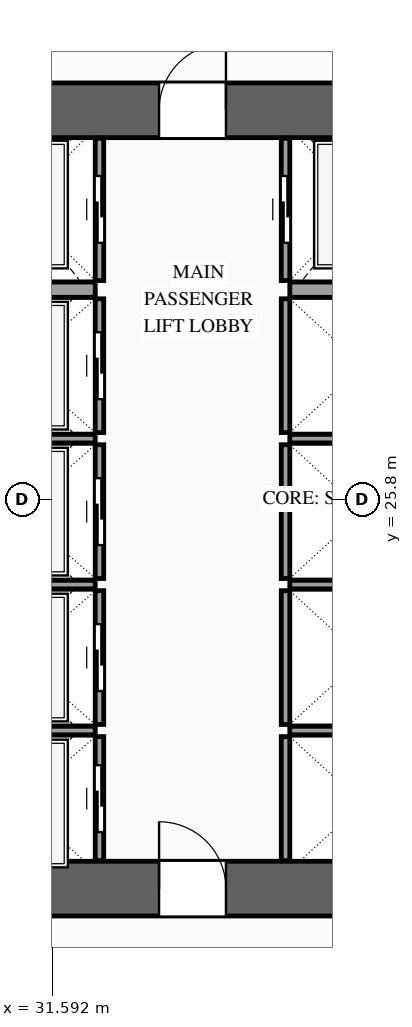
"""IFC4 building model, lengths in metres.
Left out: names, types, materials, properties, quantities, classifications, styles, units other than length and angle.
Written with IfcOpenShell. Run it as: python <this file> out.ifc"""

import sys

from ifc_helpers import new_model, si_unit, direction, frame, frame_2d, origin, place, context, subcontext, project, spatial, rectangle, extrude, source, transform, mapped, element, fill, save


model = new_model("IFC4")
c1 = context("Model", 3, precision=1e-05, world=origin(), true_north=direction((0.0, 1.0)))
c2 = subcontext(c1, "Body", "Model", "MODEL_VIEW")
j1 = project(units=[si_unit("LENGTHUNIT", "METRE"), si_unit("PLANEANGLEUNIT", "RADIAN")], contexts=[c1])
p1 = place(None, origin())
s1 = spatial("IfcSite", under=j1, at=p1, CompositionType="ELEMENT")
p2 = place(p1, origin())
s2 = spatial("IfcBuilding", under=s1, at=p2, CompositionType="ELEMENT")
p3 = place(p2, frame((0.0, 0.0, 19.8)))
s3 = spatial("IfcBuildingStorey", under=s2, at=p3, CompositionType="ELEMENT", Elevation=19.8)
p4 = place(p3, frame((23.35, 19.4, 0.0), z_axis=(0.0, 0.0, 1.0), x_axis=(1.0, 0.0, 0.0)))
e1 = element("IfcWall", 1, at=p4, inside=s3, PredefinedType="SHEAR", context=c2, shape_type="SweptSolid", body=[
    extrude(rectangle(XDim=27.3, YDim=0.9, at=frame_2d((13.65, 0.0))), origin(), (0.0, 0.0, 1.0), 6.0),
])
p5 = place(p4, frame((2.1, 0.0, 0.0)))
e2 = element("IfcOpeningElement", 2, at=p5, cuts=e1, PredefinedType="OPENING", context=c2, shape_type="SweptSolid", body=[
    extrude(rectangle(XDim=1.1, YDim=2.2, at=frame_2d((0.55, 1.1))), frame((0.0, 0.465, 0.0), z_axis=(0.0, -1.0, 0.0), x_axis=(1.0, 0.0, 0.0)), (0.0, 0.0, 1.0), 0.93),
])
p6 = place(p4, frame((10.0, 0.0, 0.0)))
e3 = element("IfcOpeningElement", 3, at=p6, cuts=e1, PredefinedType="OPENING", context=c2, shape_type="SweptSolid", body=[
    extrude(rectangle(XDim=1.1, YDim=2.2, at=frame_2d((0.55, 1.1))), frame((0.0, 0.465, 0.0), z_axis=(0.0, -1.0, 0.0), x_axis=(1.0, 0.0, 0.0)), (0.0, 0.0, 1.0), 0.93),
])
p7 = place(p4, frame((23.2, 0.0, 0.0)))
e4 = element("IfcOpeningElement", 4, at=p7, cuts=e1, PredefinedType="OPENING", context=c2, shape_type="SweptSolid", body=[
    extrude(rectangle(XDim=1.1, YDim=2.2, at=frame_2d((0.55, 1.1))), frame((0.0, 0.465, 0.0), z_axis=(0.0, -1.0, 0.0), x_axis=(1.0, 0.0, 0.0)), (0.0, 0.0, 1.0), 0.93),
])
p8 = place(p4, frame((19.82, 0.0, 0.0)))
e5 = element("IfcOpeningElement", 5, at=p8, cuts=e1, PredefinedType="OPENING", context=c2, shape_type="SweptSolid", body=[
    extrude(rectangle(XDim=0.9, YDim=2.15, at=frame_2d((0.45, 1.075))), frame((0.0, 0.465, 0.0), z_axis=(0.0, -1.0, 0.0), x_axis=(1.0, 0.0, 0.0)), (0.0, 0.0, 1.0), 0.93),
])
p9 = place(p4, frame((18.38, 0.0, 0.0)))
e6 = element("IfcOpeningElement", 6, at=p9, cuts=e1, PredefinedType="OPENING", context=c2, shape_type="SweptSolid", body=[
    extrude(rectangle(XDim=0.9, YDim=2.15, at=frame_2d((0.45, 1.075))), frame((0.0, 0.465, 0.0), z_axis=(0.0, -1.0, 0.0), x_axis=(1.0, 0.0, 0.0)), (0.0, 0.0, 1.0), 0.93),
])
p10 = place(p3, frame((23.35, 32.2, 0.0), z_axis=(0.0, 0.0, 1.0), x_axis=(1.0, 0.0, 0.0)))
e7 = element("IfcWall", 7, at=p10, inside=s3, PredefinedType="SHEAR", context=c2, shape_type="SweptSolid", body=[
    extrude(rectangle(XDim=27.3, YDim=0.9, at=frame_2d((13.65, 0.0))), origin(), (0.0, 0.0, 1.0), 6.0),
])
p11 = place(p10, frame((4.72, 0.0, 0.0)))
e8 = element("IfcOpeningElement", 8, at=p11, cuts=e7, PredefinedType="OPENING", context=c2, shape_type="SweptSolid", body=[
    extrude(rectangle(XDim=0.9, YDim=2.15, at=frame_2d((0.45, 1.075))), frame((0.0, 0.465, 0.0), z_axis=(0.0, -1.0, 0.0), x_axis=(1.0, 0.0, 0.0)), (0.0, 0.0, 1.0), 0.93),
])
p12 = place(p10, frame((10.0, 0.0, 0.0)))
e9 = element("IfcOpeningElement", 9, at=p12, cuts=e7, PredefinedType="OPENING", context=c2, shape_type="SweptSolid", body=[
    extrude(rectangle(XDim=1.1, YDim=2.2, at=frame_2d((0.55, 1.1))), frame((0.0, 0.465, 0.0), z_axis=(0.0, -1.0, 0.0), x_axis=(1.0, 0.0, 0.0)), (0.0, 0.0, 1.0), 0.93),
])
p13 = place(p10, frame((15.85, 0.0, 0.0)))
e10 = element("IfcOpeningElement", 10, at=p13, cuts=e7, PredefinedType="OPENING", context=c2, shape_type="SweptSolid", body=[
    extrude(rectangle(XDim=1.1, YDim=2.2, at=frame_2d((0.55, 1.1))), frame((0.0, 0.465, 0.0), z_axis=(0.0, -1.0, 0.0), x_axis=(1.0, 0.0, 0.0)), (0.0, 0.0, 1.0), 0.93),
])
p14 = place(p10, frame((19.82, 0.0, 0.0)))
e11 = element("IfcOpeningElement", 11, at=p14, cuts=e7, PredefinedType="OPENING", context=c2, shape_type="SweptSolid", body=[
    extrude(rectangle(XDim=0.9, YDim=2.15, at=frame_2d((0.45, 1.075))), frame((0.0, 0.465, 0.0), z_axis=(0.0, -1.0, 0.0), x_axis=(1.0, 0.0, 0.0)), (0.0, 0.0, 1.0), 0.93),
])
p15 = place(p3, frame((32.37, 19.86, 0.0), z_axis=(0.0, 0.0, 1.0), x_axis=(0.0, 1.0, 0.0)))
e12 = element("IfcWall", 12, at=p15, inside=s3, PredefinedType="SOLIDWALL", context=c2, shape_type="SweptSolid", body=[
    extrude(rectangle(XDim=2.04, YDim=0.14, at=frame_2d((1.02, 0.0))), origin(), (0.0, 0.0, 1.0), 5.68),
])
p16 = place(p15, frame((0.47, 0.0, 0.0)))
e13 = element("IfcOpeningElement", 13, at=p16, cuts=e12, PredefinedType="OPENING", context=c2, shape_type="SweptSolid", body=[
    extrude(rectangle(XDim=1.1, YDim=2.2, at=frame_2d((0.55, 1.1))), frame((0.0, 0.085, 0.0), z_axis=(0.0, -1.0, 0.0), x_axis=(1.0, 0.0, 0.0)), (0.0, 0.0, 1.0), 0.17),
])
m1 = source(origin(), c2, "Body", "SweptSolid", [
    extrude(rectangle(XDim=2.5, YDim=0.14, at=frame_2d((1.25, 0.0))), origin(), (0.0, 0.0, 1.0), 5.68),
])
p17 = place(p3, frame((29.8, 22.0, 0.0), z_axis=(0.0, 0.0, 1.0), x_axis=(1.0, 0.0, 0.0)))
e14 = element("IfcWall", 14, at=p17, inside=s3, PredefinedType="SOLIDWALL", context=c2, shape_type="MappedRepresentation", body=[
    mapped(m1, transform((0.0, 0.0, 0.0), scale=1.0)),
])
p18 = place(p3, frame((32.37, 22.1, 0.0), z_axis=(0.0, 0.0, 1.0), x_axis=(0.0, 1.0, 0.0)))
e15 = element("IfcWall", 15, at=p18, inside=s3, PredefinedType="SOLIDWALL", context=c2, shape_type="SweptSolid", body=[
    extrude(rectangle(XDim=2.2, YDim=0.14, at=frame_2d((1.1, 0.0))), origin(), (0.0, 0.0, 1.0), 5.68),
])
p19 = place(p18, frame((0.55, 0.0, 0.0)))
e16 = element("IfcOpeningElement", 16, at=p19, cuts=e15, PredefinedType="OPENING", context=c2, shape_type="SweptSolid", body=[
    extrude(rectangle(XDim=1.1, YDim=2.2, at=frame_2d((0.55, 1.1))), frame((0.0, 0.085, 0.0), z_axis=(0.0, -1.0, 0.0), x_axis=(1.0, 0.0, 0.0)), (0.0, 0.0, 1.0), 0.17),
])
p20 = place(p3, frame((29.8, 24.4, 0.0), z_axis=(0.0, 0.0, 1.0), x_axis=(1.0, 0.0, 0.0)))
e17 = element("IfcWall", 17, at=p20, inside=s3, PredefinedType="SOLIDWALL", context=c2, shape_type="MappedRepresentation", body=[
    mapped(m1, transform((0.0, 0.0, 0.0), scale=1.0)),
])
p21 = place(p3, frame((32.37, 24.5, 0.0), z_axis=(0.0, 0.0, 1.0), x_axis=(0.0, 1.0, 0.0)))
e18 = element("IfcWall", 18, at=p21, inside=s3, PredefinedType="SOLIDWALL", context=c2, shape_type="SweptSolid", body=[
    extrude(rectangle(XDim=2.2, YDim=0.14, at=frame_2d((1.1, 0.0))), origin(), (0.0, 0.0, 1.0), 5.68),
])
p22 = place(p21, frame((0.55, 0.0, 0.0)))
e19 = element("IfcOpeningElement", 19, at=p22, cuts=e18, PredefinedType="OPENING", context=c2, shape_type="SweptSolid", body=[
    extrude(rectangle(XDim=1.1, YDim=2.2, at=frame_2d((0.55, 1.1))), frame((0.0, 0.085, 0.0), z_axis=(0.0, -1.0, 0.0), x_axis=(1.0, 0.0, 0.0)), (0.0, 0.0, 1.0), 0.17),
])
p23 = place(p3, frame((29.8, 26.8, 0.0), z_axis=(0.0, 0.0, 1.0), x_axis=(1.0, 0.0, 0.0)))
e20 = element("IfcWall", 20, at=p23, inside=s3, PredefinedType="SOLIDWALL", context=c2, shape_type="MappedRepresentation", body=[
    mapped(m1, transform((0.0, 0.0, 0.0), scale=1.0)),
])
p24 = place(p3, frame((32.37, 26.9, 0.0), z_axis=(0.0, 0.0, 1.0), x_axis=(0.0, 1.0, 0.0)))
e21 = element("IfcWall", 21, at=p24, inside=s3, PredefinedType="SOLIDWALL", context=c2, shape_type="SweptSolid", body=[
    extrude(rectangle(XDim=2.2, YDim=0.14, at=frame_2d((1.1, 0.0))), origin(), (0.0, 0.0, 1.0), 5.68),
])
p25 = place(p24, frame((0.55, 0.0, 0.0)))
e22 = element("IfcOpeningElement", 22, at=p25, cuts=e21, PredefinedType="OPENING", context=c2, shape_type="SweptSolid", body=[
    extrude(rectangle(XDim=1.1, YDim=2.2, at=frame_2d((0.55, 1.1))), frame((0.0, 0.085, 0.0), z_axis=(0.0, -1.0, 0.0), x_axis=(1.0, 0.0, 0.0)), (0.0, 0.0, 1.0), 0.17),
])
p26 = place(p3, frame((32.37, 29.4, 0.0), z_axis=(0.0, 0.0, 1.0), x_axis=(0.0, 1.0, 0.0)))
e23 = element("IfcWall", 23, at=p26, inside=s3, PredefinedType="SOLIDWALL", context=c2, shape_type="SweptSolid", body=[
    extrude(rectangle(XDim=2.34, YDim=0.14, at=frame_2d((1.17, 0.0))), origin(), (0.0, 0.0, 1.0), 5.68),
])
p27 = place(p26, frame((0.62, 0.0, 0.0)))
e24 = element("IfcOpeningElement", 24, at=p27, cuts=e23, PredefinedType="OPENING", context=c2, shape_type="SweptSolid", body=[
    extrude(rectangle(XDim=1.1, YDim=2.2, at=frame_2d((0.55, 1.1))), frame((0.0, 0.085, 0.0), z_axis=(0.0, -1.0, 0.0), x_axis=(1.0, 0.0, 0.0)), (0.0, 0.0, 1.0), 0.17),
])
m2 = source(origin(), c2, "Body", "SweptSolid", [
    extrude(rectangle(XDim=2.5, YDim=0.25, at=frame_2d((1.25, 0.0))), origin(), (0.0, 0.0, 1.0), 5.68),
])
p28 = place(p3, frame((29.8, 29.25, 0.0), z_axis=(0.0, 0.0, 1.0), x_axis=(1.0, 0.0, 0.0)))
e25 = element("IfcWall", 25, at=p28, inside=s3, PredefinedType="SOLIDWALL", context=c2, shape_type="MappedRepresentation", body=[
    mapped(m2, transform((0.0, 0.0, 0.0), scale=1.0)),
])
m3 = source(origin(), c2, "Body", "SweptSolid", [
    extrude(rectangle(XDim=2.04, YDim=0.14, at=frame_2d((1.02, 0.0))), origin(), (0.0, 0.0, 1.0), 5.68),
])
p29 = place(p3, frame((35.43, 19.86, 0.0), z_axis=(0.0, 0.0, 1.0), x_axis=(0.0, 1.0, 0.0)))
e26 = element("IfcWall", 26, at=p29, inside=s3, PredefinedType="SOLIDWALL", context=c2, shape_type="MappedRepresentation", body=[
    mapped(m3, transform((0.0, 0.0, 0.0), scale=1.0)),
])
m4 = source(origin(), c2, "Body", "SweptSolid", [
    extrude(rectangle(XDim=2.4, YDim=0.14, at=frame_2d((1.2, 0.0))), origin(), (0.0, 0.0, 1.0), 5.68),
])
p30 = place(p3, frame((35.5, 22.0, 0.0), z_axis=(0.0, 0.0, 1.0), x_axis=(1.0, 0.0, 0.0)))
e27 = element("IfcWall", 27, at=p30, inside=s3, PredefinedType="SOLIDWALL", context=c2, shape_type="MappedRepresentation", body=[
    mapped(m4, transform((0.0, 0.0, 0.0), scale=1.0)),
])
m5 = source(origin(), c2, "Body", "SweptSolid", [
    extrude(rectangle(XDim=2.2, YDim=0.14, at=frame_2d((1.1, 0.0))), origin(), (0.0, 0.0, 1.0), 5.68),
])
p31 = place(p3, frame((35.43, 22.1, 0.0), z_axis=(0.0, 0.0, 1.0), x_axis=(0.0, 1.0, 0.0)))
e28 = element("IfcWall", 28, at=p31, inside=s3, PredefinedType="SOLIDWALL", context=c2, shape_type="MappedRepresentation", body=[
    mapped(m5, transform((0.0, 0.0, 0.0), scale=1.0)),
])
p32 = place(p3, frame((35.5, 24.4, 0.0), z_axis=(0.0, 0.0, 1.0), x_axis=(1.0, 0.0, 0.0)))
e29 = element("IfcWall", 29, at=p32, inside=s3, PredefinedType="SOLIDWALL", context=c2, shape_type="MappedRepresentation", body=[
    mapped(m4, transform((0.0, 0.0, 0.0), scale=1.0)),
])
p33 = place(p3, frame((35.43, 24.5, 0.0), z_axis=(0.0, 0.0, 1.0), x_axis=(0.0, 1.0, 0.0)))
e30 = element("IfcWall", 30, at=p33, inside=s3, PredefinedType="SOLIDWALL", context=c2, shape_type="MappedRepresentation", body=[
    mapped(m5, transform((0.0, 0.0, 0.0), scale=1.0)),
])
p34 = place(p3, frame((35.5, 26.8, 0.0), z_axis=(0.0, 0.0, 1.0), x_axis=(1.0, 0.0, 0.0)))
e31 = element("IfcWall", 31, at=p34, inside=s3, PredefinedType="SOLIDWALL", context=c2, shape_type="MappedRepresentation", body=[
    mapped(m4, transform((0.0, 0.0, 0.0), scale=1.0)),
])
m6 = source(origin(), c2, "Body", "SweptSolid", [
    extrude(rectangle(XDim=2.2, YDim=0.14, at=frame_2d((1.1, 0.0))), origin(), (0.0, 0.0, 1.0), 5.68),
])
p35 = place(p3, frame((35.43, 26.9, 0.0), z_axis=(0.0, 0.0, 1.0), x_axis=(0.0, 1.0, 0.0)))
e32 = element("IfcWall", 32, at=p35, inside=s3, PredefinedType="SOLIDWALL", context=c2, shape_type="MappedRepresentation", body=[
    mapped(m6, transform((0.0, 0.0, 0.0), scale=1.0)),
])
p36 = place(p3, frame((35.43, 29.4, 0.0), z_axis=(0.0, 0.0, 1.0), x_axis=(0.0, 1.0, 0.0)))
e33 = element("IfcWall", 33, at=p36, inside=s3, PredefinedType="SOLIDWALL", context=c2, shape_type="SweptSolid", body=[
    extrude(rectangle(XDim=2.34, YDim=0.14, at=frame_2d((1.17, 0.0))), origin(), (0.0, 0.0, 1.0), 5.68),
])
p37 = place(p36, frame((0.62, 0.0, 0.0)))
e34 = element("IfcOpeningElement", 34, at=p37, cuts=e33, PredefinedType="OPENING", context=c2, shape_type="SweptSolid", body=[
    extrude(rectangle(XDim=1.1, YDim=2.2, at=frame_2d((0.55, 1.1))), frame((0.0, 0.085, 0.0), z_axis=(0.0, -1.0, 0.0), x_axis=(1.0, 0.0, 0.0)), (0.0, 0.0, 1.0), 0.17),
])
m7 = source(origin(), c2, "Body", "SweptSolid", [
    extrude(rectangle(XDim=2.4, YDim=0.25, at=frame_2d((1.2, 0.0))), origin(), (0.0, 0.0, 1.0), 5.68),
])
p38 = place(p3, frame((35.5, 29.25, 0.0), z_axis=(0.0, 0.0, 1.0), x_axis=(1.0, 0.0, 0.0)))
e35 = element("IfcWall", 35, at=p38, inside=s3, PredefinedType="SOLIDWALL", context=c2, shape_type="MappedRepresentation", body=[
    mapped(m7, transform((0.0, 0.0, 0.0), scale=1.0)),
])
m8 = source(origin(), c2, "Body", "SweptSolid", [
    extrude(rectangle(XDim=1.1, YDim=2.2, at=frame_2d((0.55, 1.1))), frame((0.0, 0.025, 0.0), z_axis=(0.0, -1.0, 0.0), x_axis=(1.0, 0.0, 0.0)), (0.0, 0.0, 1.0), 0.05),
])
p39 = place(p16, origin())
e36 = element("IfcDoor", 36, at=p39, inside=s3, OperationType="SLIDING_TO_LEFT", PredefinedType="DOOR", context=c2, shape_type="MappedRepresentation", body=[
    mapped(m8, transform((0.0, 0.0, 0.0), scale=1.0)),
])
fill(e13, e36)
p40 = place(p19, origin())
e37 = element("IfcDoor", 37, at=p40, inside=s3, OperationType="SLIDING_TO_RIGHT", PredefinedType="DOOR", context=c2, shape_type="MappedRepresentation", body=[
    mapped(m8, transform((0.0, 0.0, 0.0), scale=1.0)),
])
fill(e16, e37)
p41 = place(p22, origin())
e38 = element("IfcDoor", 38, at=p41, inside=s3, OperationType="SLIDING_TO_LEFT", PredefinedType="DOOR", context=c2, shape_type="MappedRepresentation", body=[
    mapped(m8, transform((0.0, 0.0, 0.0), scale=1.0)),
])
fill(e19, e38)
p42 = place(p25, origin())
e39 = element("IfcDoor", 39, at=p42, inside=s3, OperationType="SLIDING_TO_RIGHT", PredefinedType="DOOR", context=c2, shape_type="MappedRepresentation", body=[
    mapped(m8, transform((0.0, 0.0, 0.0), scale=1.0)),
])
fill(e22, e39)
p43 = place(p27, origin())
e40 = element("IfcDoor", 40, at=p43, inside=s3, OperationType="SLIDING_TO_LEFT", PredefinedType="DOOR", context=c2, shape_type="MappedRepresentation", body=[
    mapped(m8, transform((0.0, 0.0, 0.0), scale=1.0)),
])
fill(e24, e40)
p44 = place(p37, origin())
e41 = element("IfcDoor", 41, at=p44, inside=s3, OperationType="SLIDING_TO_RIGHT", PredefinedType="DOOR", context=c2, shape_type="MappedRepresentation", body=[
    mapped(m8, transform((0.0, 0.0, 0.0), scale=1.0)),
])
fill(e34, e41)
m9 = source(origin(), c2, "Body", "SweptSolid", [
    extrude(rectangle(XDim=1.1, YDim=2.2, at=frame_2d((0.55, 1.1))), frame((0.0, 0.025, 0.0), z_axis=(0.0, -1.0, 0.0), x_axis=(1.0, 0.0, 0.0)), (0.0, 0.0, 1.0), 0.05),
])
p45 = place(p6, origin())
e42 = element("IfcDoor", 42, at=p45, inside=s3, OperationType="SINGLE_SWING_LEFT", PredefinedType="DOOR", context=c2, shape_type="MappedRepresentation", body=[
    mapped(m9, transform((0.0, 0.0, 0.0), scale=1.0)),
])
fill(e3, e42)
p46 = place(p12, origin())
e43 = element("IfcDoor", 43, at=p46, inside=s3, OperationType="SINGLE_SWING_RIGHT", PredefinedType="DOOR", context=c2, shape_type="MappedRepresentation", body=[
    mapped(m9, transform((0.0, 0.0, 0.0), scale=1.0)),
])
fill(e9, e43)
save(model, sys.argv[1])
